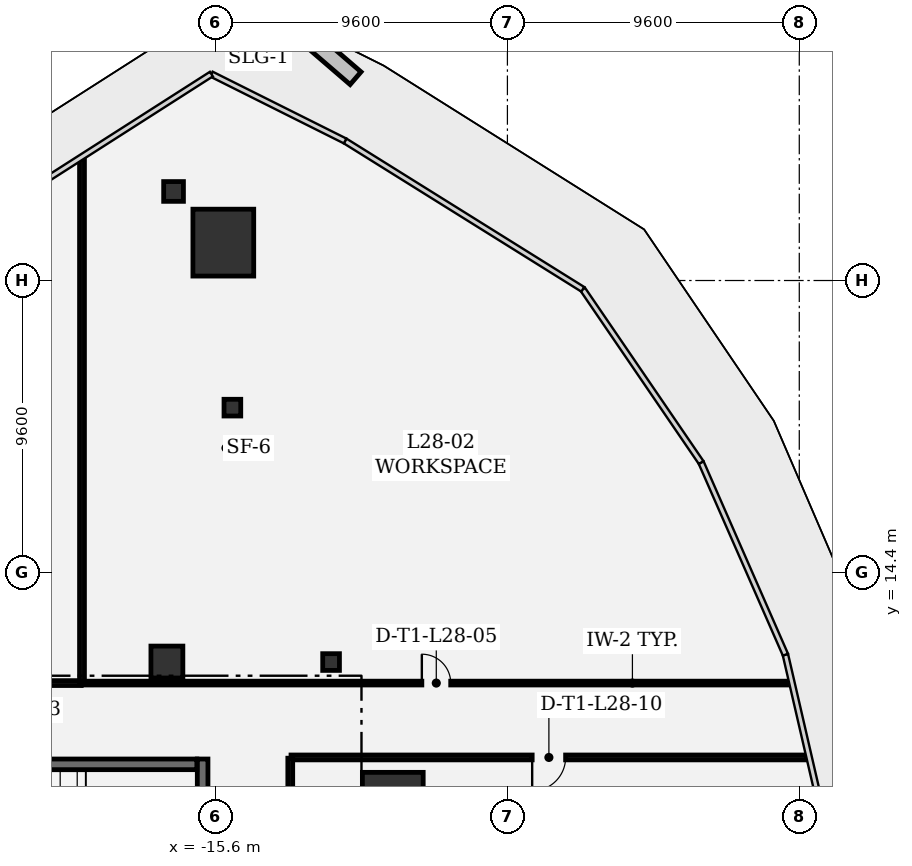
"""IFC4 building model, lengths in metres.
Left out: names, types, materials, properties, quantities, classifications, styles, units other than length and angle.
Written with IfcOpenShell. Run it as: python <this file> out.ifc"""

import sys

from ifc_helpers import new_model, si_unit, direction, frame, frame_2d, origin, origin_2d, place, context, subcontext, project, spatial, rectangle, extrude, element, fill, save


model = new_model("IFC4")
c1 = context("Model", 3, precision=1e-05, world=origin(), true_north=direction((0.0, 1.0)))
c2 = subcontext(c1, "Body", "Model", "MODEL_VIEW")
j1 = project(units=[si_unit("LENGTHUNIT", "METRE"), si_unit("PLANEANGLEUNIT", "RADIAN")], contexts=[c1])
p1 = place(None, origin())
s1 = spatial("IfcSite", under=j1, at=p1, CompositionType="ELEMENT")
p2 = place(p1, origin())
s2 = spatial("IfcBuilding", under=s1, at=p2, CompositionType="ELEMENT")
p3 = place(p2, frame((0.0, 0.0, 126.0)))
s3 = spatial("IfcBuildingStorey", under=s2, at=p3, CompositionType="ELEMENT", Elevation=126.0)
for number, where, z_axis, x_axis in (
    (1, (-9.77, 6.721, 0.0), (0.0, 0.0, 1.0), (1.0, 0.0, 0.0)),
    (2, (-15.344, 25.246, 0.0), (0.0, 0.0, 1.0), (1.0, 0.0, 0.0)),
):
    element("IfcColumn", number, at=place(p3, frame(where, z_axis=z_axis, x_axis=x_axis)), inside=s3, PredefinedType="COLUMN", context=c2, shape_type="SweptSolid", body=[
        extrude(rectangle(XDim=2.0, YDim=2.2, at=origin_2d()), origin(), (0.0, 0.0, 1.0), 4.05),
    ])
p4 = place(p3, frame((-17.2, 11.45, 0.0), z_axis=(0.0, 0.0, 1.0), x_axis=(1.0, 0.0, 0.0)))
e3 = element("IfcColumn", 3, at=p4, inside=s3, PredefinedType="COLUMN", context=c2, shape_type="SweptSolid", body=[
    extrude(rectangle(XDim=1.05, YDim=1.05, at=origin_2d()), origin(), (0.0, 0.0, 1.0), 4.05),
])
p5 = place(p3, frame((-16.981, 26.929, 0.0), z_axis=(0.0, 0.0, 1.0), x_axis=(1.0, 0.0, 0.0)))
e4 = element("IfcColumn", 4, at=p5, inside=s3, PredefinedType="COLUMN", context=c2, shape_type="SweptSolid", body=[
    extrude(rectangle(XDim=0.65, YDim=0.65, at=origin_2d()), origin(), (0.0, 0.0, 1.0), 4.05),
])
for number, where, z_axis, x_axis in (
    (5, (-15.046, 19.818, 0.0), (0.0, 0.0, 1.0), (1.0, 0.0, 0.0)),
    (6, (-11.8, 11.45, 0.0), (0.0, 0.0, 1.0), (1.0, 0.0, 0.0)),
):
    element("IfcColumn", number, at=place(p3, frame(where, z_axis=z_axis, x_axis=x_axis)), inside=s3, PredefinedType="COLUMN", context=c2, shape_type="SweptSolid", body=[
        extrude(rectangle(XDim=0.55, YDim=0.55, at=origin_2d()), origin(), (0.0, 0.0, 1.0), 4.05),
    ])
p6 = place(p3, frame((-16.025, 4.05, 0.0), z_axis=(0.0, 0.0, 1.0), x_axis=(0.0, 1.0, 0.0)))
e7 = element("IfcWall", 7, at=p6, inside=s3, PredefinedType="SHEAR", context=c2, shape_type="SweptSolid", body=[
    extrude(rectangle(XDim=4.21, YDim=0.35, at=frame_2d((2.105, 0.0))), origin(), (0.0, 0.0, 1.0), 3.77),
])
p7 = place(p3, frame((-16.215, 8.085, 0.0), z_axis=(0.0, 0.0, 1.0), x_axis=(-1.0, 0.0, 0.0)))
e8 = element("IfcWall", 8, at=p7, inside=s3, PredefinedType="SHEAR", context=c2, shape_type="SweptSolid", body=[
    extrude(rectangle(XDim=8.12, YDim=0.35, at=frame_2d((4.06, 0.0))), origin(), (0.0, 0.0, 1.0), 3.77),
])
p8 = place(p7, frame((6.74, 0.0, 0.0)))
e9 = element("IfcOpeningElement", 9, at=p8, cuts=e8, PredefinedType="OPENING", context=c2, shape_type="SweptSolid", body=[
    extrude(rectangle(XDim=1.1, YDim=2.2, at=frame_2d((0.55, 1.1))), frame((0.0, 0.185, 0.0), z_axis=(0.0, -1.0, 0.0), x_axis=(1.0, 0.0, 0.0)), (0.0, 0.0, 1.0), 0.37),
])
p9 = place(p3, frame((-37.833, 10.758, 0.0), z_axis=(0.0, 0.0, 1.0), x_axis=(1.0, 0.0, 0.0)))
e10 = element("IfcWall", 10, at=p9, inside=s3, PredefinedType="PARTITIONING", context=c2, shape_type="SweptSolid", body=[
    extrude(rectangle(XDim=17.815, YDim=0.16, at=frame_2d((8.908, 0.0))), origin(), (0.0, 0.0, 1.0), 3.334),
])
p10 = place(p9, frame((8.358, 0.0, 0.0)))
e11 = element("IfcOpeningElement", 11, at=p10, cuts=e10, PredefinedType="OPENING", context=c2, shape_type="SweptSolid", body=[
    extrude(rectangle(XDim=1.1, YDim=2.15, at=frame_2d((0.55, 1.075))), frame((0.0, 0.09, 0.0), z_axis=(0.0, -1.0, 0.0), x_axis=(1.0, 0.0, 0.0)), (0.0, 0.0, 1.0), 0.18),
])
p11 = place(p3, frame((-19.993, 10.783, 0.0), z_axis=(0.0, 0.0, 1.0), x_axis=(0.0, 1.0, 0.0)))
e12 = element("IfcWall", 12, at=p11, inside=s3, PredefinedType="PARTITIONING", context=c2, shape_type="SweptSolid", body=[
    extrude(rectangle(XDim=17.206, YDim=0.16, at=frame_2d((8.603, 0.0))), origin(), (0.0, 0.0, 1.0), 2.885),
])
p12 = place(p3, frame((-19.96, 10.758, 0.0), z_axis=(0.0, 0.0, 1.0), x_axis=(1.0, 0.0, 0.0)))
e13 = element("IfcWall", 13, at=p12, inside=s3, PredefinedType="PARTITIONING", context=c2, shape_type="SweptSolid", body=[
    extrude(rectangle(XDim=23.24, YDim=0.125, at=frame_2d((11.62, 0.0))), origin(), (0.0, 0.0, 1.0), 2.885),
])
p13 = place(p12, frame((11.145, 0.0, 0.0)))
e14 = element("IfcOpeningElement", 14, at=p13, cuts=e13, PredefinedType="OPENING", context=c2, shape_type="SweptSolid", body=[
    extrude(rectangle(XDim=0.95, YDim=2.15, at=frame_2d((0.475, 1.075))), frame((0.0, 0.073, 0.0), z_axis=(0.0, -1.0, 0.0), x_axis=(1.0, 0.0, 0.0)), (0.0, 0.0, 1.0), 0.145),
])
p14 = place(p3, frame((3.846, 8.312, 0.0), z_axis=(0.0, 0.0, 1.0), x_axis=(-1.0, 0.0, 0.0)))
e15 = element("IfcWall", 15, at=p14, inside=s3, PredefinedType="PARTITIONING", context=c2, shape_type="SweptSolid", body=[
    extrude(rectangle(XDim=16.963, YDim=0.16, at=frame_2d((8.481, 0.0))), origin(), (0.0, 0.0, 1.0), 2.885),
])
p15 = place(p14, frame((7.931, 0.0, 0.0)))
e16 = element("IfcOpeningElement", 16, at=p15, cuts=e15, PredefinedType="OPENING", context=c2, shape_type="SweptSolid", body=[
    extrude(rectangle(XDim=1.1, YDim=2.15, at=frame_2d((0.55, 1.075))), frame((0.0, 0.09, 0.0), z_axis=(0.0, -1.0, 0.0), x_axis=(1.0, 0.0, 0.0)), (0.0, 0.0, 1.0), 0.18),
])
p16 = place(p3, frame((-13.142, 8.287, 0.0), z_axis=(0.0, 0.0, 1.0), x_axis=(0.0, -1.0, 0.0)))
e17 = element("IfcWall", 17, at=p16, inside=s3, PredefinedType="PARTITIONING", context=c2, shape_type="SweptSolid", body=[
    extrude(rectangle(XDim=16.804, YDim=0.16, at=frame_2d((8.402, 0.0))), origin(), (0.0, 0.0, 1.0), 3.77),
])
p17 = place(p13, origin())
e18 = element("IfcDoor", 18, at=p17, inside=s3, OperationType="SINGLE_SWING_LEFT", PredefinedType="DOOR", context=c2, shape_type="SweptSolid", body=[
    extrude(rectangle(XDim=0.95, YDim=2.15, at=frame_2d((0.475, 1.075))), frame((0.0, 0.025, 0.0), z_axis=(0.0, -1.0, 0.0), x_axis=(1.0, 0.0, 0.0)), (0.0, 0.0, 1.0), 0.05),
])
fill(e14, e18)
p18 = place(p15, origin())
e19 = element("IfcDoor", 19, at=p18, inside=s3, OperationType="SINGLE_SWING_RIGHT", PredefinedType="DOOR", context=c2, shape_type="SweptSolid", body=[
    extrude(rectangle(XDim=1.1, YDim=2.15, at=frame_2d((0.55, 1.075))), frame((0.0, 0.025, 0.0), z_axis=(0.0, -1.0, 0.0), x_axis=(1.0, 0.0, 0.0)), (0.0, 0.0, 1.0), 0.05),
])
fill(e16, e19)
save(model, sys.argv[1])
